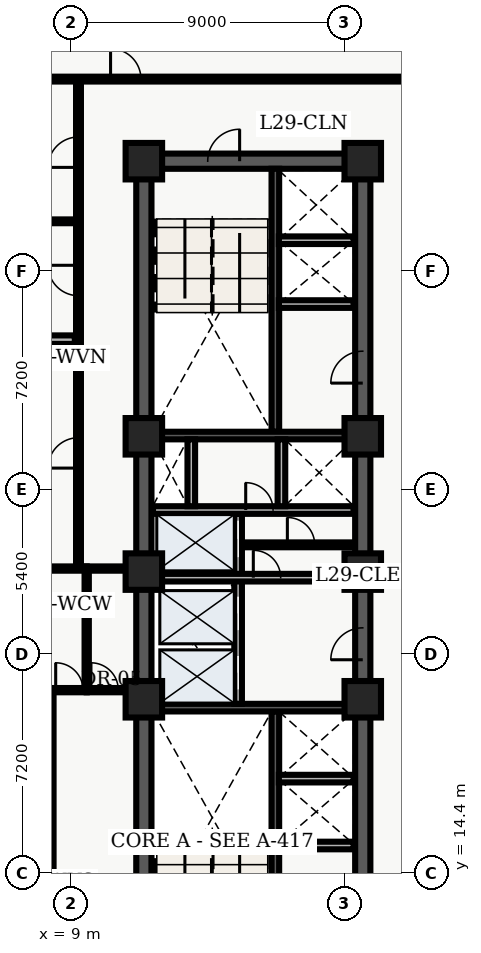
"""IFC4 building model, lengths in metres.
Left out: names, types, materials, properties, quantities, classifications, styles, units other than length and angle.
Written with IfcOpenShell. Run it as: python <this file> out.ifc"""

import sys

from ifc_helpers import new_model, entity, si_unit, converted_unit, direction, frame, origin_with_axes, origin_2d_with_axis, place, context, subcontext, project, spatial, polyline, rectangle, outline, extrude, element, fill, save


model = new_model("IFC4")
c1 = context("Model", 3, precision=1e-05, world=origin_with_axes(), true_north=direction((0.0, 1.0)))
c2 = subcontext(c1, "Body", "Model", "MODEL_VIEW")
j1 = project(units=[si_unit("LENGTHUNIT", "METRE"), converted_unit("PLANEANGLEUNIT", "DEGREE", entity("IfcPlaneAngleMeasure", 0.017), si_unit("PLANEANGLEUNIT", "RADIAN"), dimensions=[0, 0, 0, 0, 0, 0, 0])], contexts=[c1])
p1 = place(None, origin_with_axes())
s1 = spatial("IfcSite", under=j1, at=p1, CompositionType="ELEMENT")
p2 = place(p1, origin_with_axes())
s2 = spatial("IfcBuilding", under=s1, at=p2, CompositionType="ELEMENT")
p3 = place(p2, frame((0.0, 0.0, 120.3), z_axis=(0.0, 0.0, 1.0), x_axis=(1.0, 0.0, 0.0)))
s3 = spatial("IfcBuildingStorey", under=s2, at=p3, CompositionType="ELEMENT", Elevation=120.3)
p4 = place(p3, frame((11.4, 10.8, 0.0), z_axis=(0.0, 0.0, 1.0), x_axis=(0.0, 1.0, 0.0)))
e1 = element("IfcWall", 1, at=p4, inside=s3, PredefinedType="SHEAR", context=c2, shape_type="SweptSolid", body=[
    extrude(outline(polyline([(0.0, -0.25), (27.0, -0.25), (27.0, 0.25), (0.0, 0.25), (0.0, -0.25)])), origin_with_axes(), (0.0, 0.0, 1.0), 3.6),
])
p5 = place(p3, frame((11.4, 37.8, 0.0), z_axis=(0.0, 0.0, 1.0), x_axis=(1.0, 0.0, 0.0)))
e2 = element("IfcWall", 2, at=p5, inside=s3, PredefinedType="SHEAR", context=c2, shape_type="SweptSolid", body=[
    extrude(outline(polyline([(0.0, -0.25), (7.2, -0.25), (7.2, 0.25), (0.0, 0.25), (0.0, -0.25)])), origin_with_axes(), (0.0, 0.0, 1.0), 3.6),
])
p6 = place(p5, frame((2.625, 0.0, 0.0), z_axis=(0.0, 0.0, 1.0), x_axis=(1.0, 0.0, 0.0)))
e3 = element("IfcOpeningElement", 3, at=p6, cuts=e2, PredefinedType="OPENING", context=c2, shape_type="SweptSolid", body=[
    extrude(rectangle(XDim=1.05, YDim=0.52, at=origin_2d_with_axis()), origin_with_axes(), (0.0, 0.0, 1.0), 2.15),
])
p7 = place(p3, frame((18.6, 10.8, 0.0), z_axis=(0.0, 0.0, 1.0), x_axis=(0.0, 1.0, 0.0)))
e4 = element("IfcWall", 4, at=p7, inside=s3, PredefinedType="SHEAR", context=c2, shape_type="SweptSolid", body=[
    extrude(outline(polyline([(0.0, -0.25), (13.5, -0.25), (13.5, 0.25), (0.0, 0.25), (0.0, -0.25)])), origin_with_axes(), (0.0, 0.0, 1.0), 3.6),
])
p8 = place(p7, frame((11.125, 0.0, 0.0), z_axis=(0.0, 0.0, 1.0), x_axis=(1.0, 0.0, 0.0)))
e5 = element("IfcOpeningElement", 5, at=p8, cuts=e4, PredefinedType="OPENING", context=c2, shape_type="SweptSolid", body=[
    extrude(rectangle(XDim=1.05, YDim=0.52, at=origin_2d_with_axis()), origin_with_axes(), (0.0, 0.0, 1.0), 2.15),
])
p9 = place(p7, frame((2.325, 0.0, 0.0), z_axis=(0.0, 0.0, 1.0), x_axis=(1.0, 0.0, 0.0)))
e6 = element("IfcOpeningElement", 6, at=p9, cuts=e4, PredefinedType="OPENING", context=c2, shape_type="SweptSolid", body=[
    extrude(rectangle(XDim=0.95, YDim=0.52, at=origin_2d_with_axis()), origin_with_axes(), (0.0, 0.0, 1.0), 2.15),
])
p10 = place(p3, frame((18.6, 24.3, 0.0), z_axis=(0.0, 0.0, 1.0), x_axis=(0.0, 1.0, 0.0)))
e7 = element("IfcWall", 7, at=p10, inside=s3, PredefinedType="SHEAR", context=c2, shape_type="SweptSolid", body=[
    extrude(outline(polyline([(0.0, -0.25), (13.5, -0.25), (13.5, 0.25), (0.0, 0.25), (0.0, -0.25)])), origin_with_axes(), (0.0, 0.0, 1.0), 3.6),
])
p11 = place(p10, frame((6.725, 0.0, 0.0), z_axis=(0.0, 0.0, 1.0), x_axis=(1.0, 0.0, 0.0)))
e8 = element("IfcOpeningElement", 8, at=p11, cuts=e7, PredefinedType="OPENING", context=c2, shape_type="SweptSolid", body=[
    extrude(rectangle(XDim=1.05, YDim=0.52, at=origin_2d_with_axis()), origin_with_axes(), (0.0, 0.0, 1.0), 2.15),
])
p12 = place(p3, frame((15.725, 11.05, 0.0), z_axis=(0.0, 0.0, 1.0), x_axis=(0.0, 1.0, 0.0)))
e9 = element("IfcWall", 9, at=p12, inside=s3, PredefinedType="SHEAR", context=c2, shape_type="SweptSolid", body=[
    extrude(outline(polyline([(0.0, -0.125), (8.65, -0.125), (8.65, 0.125), (0.0, 0.125), (0.0, -0.125)])), origin_with_axes(), (0.0, 0.0, 1.0), 3.6),
])
p13 = place(p3, frame((11.65, 19.825, 0.0), z_axis=(0.0, 0.0, 1.0), x_axis=(1.0, 0.0, 0.0)))
e10 = element("IfcWall", 10, at=p13, inside=s3, PredefinedType="SHEAR", context=c2, shape_type="SweptSolid", body=[
    extrude(outline(polyline([(0.0, -0.125), (6.7, -0.125), (6.7, 0.125), (0.0, 0.125), (0.0, -0.125)])), origin_with_axes(), (0.0, 0.0, 1.0), 3.6),
])
p14 = place(p3, frame((15.725, 28.9, 0.0), z_axis=(0.0, 0.0, 1.0), x_axis=(0.0, 1.0, 0.0)))
e11 = element("IfcWall", 11, at=p14, inside=s3, PredefinedType="SHEAR", context=c2, shape_type="SweptSolid", body=[
    extrude(outline(polyline([(0.0, -0.125), (8.65, -0.125), (8.65, 0.125), (0.0, 0.125), (0.0, -0.125)])), origin_with_axes(), (0.0, 0.0, 1.0), 3.6),
])
p15 = place(p3, frame((11.65, 28.775, 0.0), z_axis=(0.0, 0.0, 1.0), x_axis=(1.0, 0.0, 0.0)))
e12 = element("IfcWall", 12, at=p15, inside=s3, PredefinedType="SHEAR", context=c2, shape_type="SweptSolid", body=[
    extrude(outline(polyline([(0.0, -0.125), (6.7, -0.125), (6.7, 0.125), (0.0, 0.125), (0.0, -0.125)])), origin_with_axes(), (0.0, 0.0, 1.0), 3.6),
])
p16 = place(p3, frame((14.5, 19.95, 0.0), z_axis=(0.0, 0.0, 1.0), x_axis=(0.0, 1.0, 0.0)))
e13 = element("IfcWall", 13, at=p16, inside=s3, PredefinedType="SOLIDWALL", context=c2, shape_type="SweptSolid", body=[
    extrude(outline(polyline([(0.0, -0.125), (6.25, -0.125), (6.25, 0.125), (0.0, 0.125), (0.0, -0.125)])), origin_with_axes(), (0.0, 0.0, 1.0), 2.64),
])
p17 = place(p16, frame((1.025, 0.0, 0.0), z_axis=(0.0, 0.0, 1.0), x_axis=(1.0, 0.0, 0.0)))
e14 = element("IfcOpeningElement", 14, at=p17, cuts=e13, PredefinedType="OPENING", context=c2, shape_type="SweptSolid", body=[
    extrude(rectangle(XDim=1.1, YDim=0.27, at=origin_2d_with_axis()), origin_with_axes(), (0.0, 0.0, 1.0), 2.15),
])
p18 = place(p16, frame((2.975, 0.0, 0.0), z_axis=(0.0, 0.0, 1.0), x_axis=(1.0, 0.0, 0.0)))
e15 = element("IfcOpeningElement", 15, at=p18, cuts=e13, PredefinedType="OPENING", context=c2, shape_type="SweptSolid", body=[
    extrude(rectangle(XDim=1.1, YDim=0.27, at=origin_2d_with_axis()), origin_with_axes(), (0.0, 0.0, 1.0), 2.15),
])
p19 = place(p16, frame((5.425, 0.0, 0.0), z_axis=(0.0, 0.0, 1.0), x_axis=(1.0, 0.0, 0.0)))
e16 = element("IfcOpeningElement", 16, at=p19, cuts=e13, PredefinedType="OPENING", context=c2, shape_type="SweptSolid", body=[
    extrude(rectangle(XDim=1.2, YDim=0.27, at=origin_2d_with_axis()), origin_with_axes(), (0.0, 0.0, 1.0), 2.15),
])
p20 = place(p3, frame((11.7, 24.1, 0.0), z_axis=(0.0, 0.0, 1.0), x_axis=(1.0, 0.0, 0.0)))
e17 = element("IfcWall", 17, at=p20, inside=s3, PredefinedType="SOLIDWALL", context=c2, shape_type="SweptSolid", body=[
    extrude(outline(polyline([(0.0, -0.125), (6.6, -0.125), (6.6, 0.125), (0.0, 0.125), (0.0, -0.125)])), origin_with_axes(), (0.0, 0.0, 1.0), 2.64),
])
p21 = place(p20, frame((3.75, 0.0, 0.0), z_axis=(0.0, 0.0, 1.0), x_axis=(1.0, 0.0, 0.0)))
e18 = element("IfcOpeningElement", 18, at=p21, cuts=e17, PredefinedType="OPENING", context=c2, shape_type="SweptSolid", body=[
    extrude(rectangle(XDim=0.9, YDim=0.27, at=origin_2d_with_axis()), origin_with_axes(), (0.0, 0.0, 1.0), 2.15),
])
p22 = place(p3, frame((11.7, 26.325, 0.0), z_axis=(0.0, 0.0, 1.0), x_axis=(1.0, 0.0, 0.0)))
e19 = element("IfcWall", 19, at=p22, inside=s3, PredefinedType="SOLIDWALL", context=c2, shape_type="SweptSolid", body=[
    extrude(outline(polyline([(0.0, -0.125), (6.6, -0.125), (6.6, 0.125), (0.0, 0.125), (0.0, -0.125)])), origin_with_axes(), (0.0, 0.0, 1.0), 2.64),
])
p23 = place(p22, frame((3.5, 0.0, 0.0), z_axis=(0.0, 0.0, 1.0), x_axis=(1.0, 0.0, 0.0)))
e20 = element("IfcOpeningElement", 20, at=p23, cuts=e19, PredefinedType="OPENING", context=c2, shape_type="SweptSolid", body=[
    extrude(rectangle(XDim=0.9, YDim=0.27, at=origin_2d_with_axis()), origin_with_axes(), (0.0, 0.0, 1.0), 2.15),
])
for number, where, z_axis, x_axis in (
    (21, (12.96, 26.45, 0.0), (0.0, 0.0, 1.0), (0.0, 1.0, 0.0)),
    (22, (15.925, 26.45, 0.0), (0.0, 0.0, 1.0), (0.0, 1.0, 0.0)),
):
    element("IfcWall", number, at=place(p3, frame(where, z_axis=z_axis, x_axis=x_axis)), inside=s3, PredefinedType="SOLIDWALL", context=c2, shape_type="SweptSolid", body=[
        extrude(outline(polyline([(0.0, -0.125), (2.2, -0.125), (2.2, 0.125), (0.0, 0.125), (0.0, -0.125)])), origin_with_axes(), (0.0, 0.0, 1.0), 2.64),
    ])
for number, where, z_axis, x_axis in (
    (23, (11.4, 20.1, 0.0), (0.0, 0.0, 1.0), (1.0, 0.0, 0.0)),
    (24, (11.4, 24.3, 0.0), (0.0, 0.0, 1.0), (1.0, 0.0, 0.0)),
    (25, (11.4, 28.75, 0.0), (0.0, 0.0, 1.0), (1.0, 0.0, 0.0)),
    (26, (11.4, 37.8, 0.0), (0.0, 0.0, 1.0), (1.0, 0.0, 0.0)),
    (27, (18.6, 20.1, 0.0), (0.0, 0.0, 1.0), (1.0, 0.0, 0.0)),
    (28, (18.6, 24.3, 0.0), (0.0, 0.0, 1.0), (1.0, 0.0, 0.0)),
    (29, (18.6, 28.75, 0.0), (0.0, 0.0, 1.0), (1.0, 0.0, 0.0)),
    (30, (18.6, 37.8, 0.0), (0.0, 0.0, 1.0), (1.0, 0.0, 0.0)),
):
    element("IfcColumn", number, at=place(p3, frame(where, z_axis=z_axis, x_axis=x_axis)), inside=s3, PredefinedType="COLUMN", context=c2, shape_type="SweptSolid", body=[
        extrude(rectangle(XDim=1.2, YDim=1.2, at=origin_2d_with_axis()), origin_with_axes(), (0.0, 0.0, 1.0), 3.9),
    ])
p24 = place(p3, frame((14.62, 25.18, 0.0), z_axis=(0.0, 0.0, 1.0), x_axis=(1.0, 0.0, 0.0)))
e31 = element("IfcWall", 31, at=p24, inside=s3, PredefinedType="PARTITIONING", context=c2, shape_type="SweptSolid", body=[
    extrude(outline(polyline([(0.0, -0.08), (3.68, -0.08), (3.68, 0.08), (0.0, 0.08), (0.0, -0.08)])), origin_with_axes(), (0.0, 0.0, 1.0), 2.64),
])
p25 = place(p24, frame((1.95, 0.0, 0.0), z_axis=(0.0, 0.0, 1.0), x_axis=(1.0, 0.0, 0.0)))
e32 = element("IfcOpeningElement", 32, at=p25, cuts=e31, PredefinedType="OPENING", context=c2, shape_type="SweptSolid", body=[
    extrude(rectangle(XDim=0.9, YDim=0.18, at=origin_2d_with_axis()), origin_with_axes(), (0.0, 0.0, 1.0), 2.15),
])
for number, where, z_axis, x_axis in (
    (33, (15.84, 15.29, 0.0), (0.0, 0.0, 1.0), (1.0, 0.0, 0.0)),
    (34, (15.84, 17.49, 0.0), (0.0, 0.0, 1.0), (1.0, 0.0, 0.0)),
    (35, (15.84, 33.1, 0.0), (0.0, 0.0, 1.0), (1.0, 0.0, 0.0)),
    (36, (15.84, 35.2, 0.0), (0.0, 0.0, 1.0), (1.0, 0.0, 0.0)),
):
    element("IfcWall", number, at=place(p3, frame(where, z_axis=z_axis, x_axis=x_axis)), inside=s3, PredefinedType="SOLIDWALL", context=c2, shape_type="SweptSolid", body=[
        extrude(outline(polyline([(0.0, -0.125), (2.46, -0.125), (2.46, 0.125), (0.0, 0.125), (0.0, -0.125)])), origin_with_axes(), (0.0, 0.0, 1.0), 2.64),
    ])
p26 = place(p3, frame((9.52, 20.4, 0.0), z_axis=(0.0, 0.0, 1.0), x_axis=(0.0, 1.0, 0.0)))
e37 = element("IfcWall", 37, at=p26, inside=s3, PredefinedType="PARTITIONING", context=c2, shape_type="SweptSolid", body=[
    extrude(outline(polyline([(0.0, -0.07), (4.0, -0.07), (4.0, 0.07), (0.0, 0.07), (0.0, -0.07)])), origin_with_axes(), (0.0, 0.0, 1.0), 2.64),
])
p27 = place(p3, frame((9.52, 20.4, 0.0), z_axis=(0.0, 0.0, 1.0), x_axis=(1.0, 0.0, 0.0)))
e38 = element("IfcWall", 38, at=p27, inside=s3, PredefinedType="PARTITIONING", context=c2, shape_type="SweptSolid", body=[
    extrude(outline(polyline([(0.0, -0.07), (1.58, -0.07), (1.58, 0.07), (0.0, 0.07), (0.0, -0.07)])), origin_with_axes(), (0.0, 0.0, 1.0), 2.64),
])
p28 = place(p27, frame((0.59, 0.0, 0.0), z_axis=(0.0, 0.0, 1.0), x_axis=(1.0, 0.0, 0.0)))
e39 = element("IfcOpeningElement", 39, at=p28, cuts=e38, PredefinedType="OPENING", context=c2, shape_type="SweptSolid", body=[
    extrude(rectangle(XDim=0.9, YDim=0.16, at=origin_2d_with_axis()), origin_with_axes(), (0.0, 0.0, 1.0), 2.15),
])
p29 = place(p3, frame((9.52, 24.4, 0.0), z_axis=(0.0, 0.0, 1.0), x_axis=(1.0, 0.0, 0.0)))
e40 = element("IfcWall", 40, at=p29, inside=s3, PredefinedType="PARTITIONING", context=c2, shape_type="SweptSolid", body=[
    extrude(outline(polyline([(0.0, -0.07), (1.58, -0.07), (1.58, 0.07), (0.0, 0.07), (0.0, -0.07)])), origin_with_axes(), (0.0, 0.0, 1.0), 2.64),
])
p30 = place(p3, frame((2.6, 40.5, 0.0), z_axis=(0.0, 0.0, 1.0), x_axis=(1.0, 0.0, 0.0)))
e41 = element("IfcWall", 41, at=p30, inside=s3, PredefinedType="PARTITIONING", context=c2, shape_type="SweptSolid", body=[
    extrude(outline(polyline([(0.0, -0.08), (18.65, -0.08), (18.65, 0.08), (0.0, 0.08), (0.0, -0.08)])), origin_with_axes(), (0.0, 0.0, 1.0), 2.64),
])
p31 = place(p30, frame((8.205, 0.0, 0.0), z_axis=(0.0, 0.0, 1.0), x_axis=(1.0, 0.0, 0.0)))
e42 = element("IfcOpeningElement", 42, at=p31, cuts=e41, PredefinedType="OPENING", context=c2, shape_type="SweptSolid", body=[
    extrude(rectangle(XDim=1.0, YDim=0.18, at=origin_2d_with_axis()), origin_with_axes(), (0.0, 0.0, 1.0), 2.15),
])
p32 = place(p3, frame((8.35, 7.8, 0.0), z_axis=(0.0, 0.0, 1.0), x_axis=(0.0, 1.0, 0.0)))
e43 = element("IfcWall", 43, at=p32, inside=s3, PredefinedType="PARTITIONING", context=c2, shape_type="SweptSolid", body=[
    extrude(outline(polyline([(0.0, -0.08), (12.6, -0.08), (12.6, 0.08), (0.0, 0.08), (0.0, -0.08)])), origin_with_axes(), (0.0, 0.0, 1.0), 2.64),
])
p33 = place(p32, frame((2.914, 0.0, 0.0), z_axis=(0.0, 0.0, 1.0), x_axis=(1.0, 0.0, 0.0)))
e44 = element("IfcOpeningElement", 44, at=p33, cuts=e43, PredefinedType="OPENING", context=c2, shape_type="SweptSolid", body=[
    extrude(rectangle(XDim=1.0, YDim=0.18, at=origin_2d_with_axis()), origin_with_axes(), (0.0, 0.0, 1.0), 2.15),
])
p34 = place(p32, frame((9.11, 0.0, 0.0), z_axis=(0.0, 0.0, 1.0), x_axis=(1.0, 0.0, 0.0)))
e45 = element("IfcOpeningElement", 45, at=p34, cuts=e43, PredefinedType="OPENING", context=c2, shape_type="SweptSolid", body=[
    extrude(rectangle(XDim=1.0, YDim=0.18, at=origin_2d_with_axis()), origin_with_axes(), (0.0, 0.0, 1.0), 2.15),
])
p35 = place(p3, frame((9.25, 24.4, 0.0), z_axis=(0.0, 0.0, 1.0), x_axis=(0.0, 1.0, 0.0)))
e46 = element("IfcWall", 46, at=p35, inside=s3, PredefinedType="PARTITIONING", context=c2, shape_type="SweptSolid", body=[
    extrude(outline(polyline([(0.0, -0.08), (16.1, -0.08), (16.1, 0.08), (0.0, 0.08), (0.0, -0.08)])), origin_with_axes(), (0.0, 0.0, 1.0), 2.64),
])
p36 = place(p35, frame((3.804, 0.0, 0.0), z_axis=(0.0, 0.0, 1.0), x_axis=(1.0, 0.0, 0.0)))
e47 = element("IfcOpeningElement", 47, at=p36, cuts=e46, PredefinedType="OPENING", context=c2, shape_type="SweptSolid", body=[
    extrude(rectangle(XDim=1.0, YDim=0.18, at=origin_2d_with_axis()), origin_with_axes(), (0.0, 0.0, 1.0), 2.15),
])
p37 = place(p35, frame((9.476, 0.0, 0.0), z_axis=(0.0, 0.0, 1.0), x_axis=(1.0, 0.0, 0.0)))
e48 = element("IfcOpeningElement", 48, at=p37, cuts=e46, PredefinedType="OPENING", context=c2, shape_type="SweptSolid", body=[
    extrude(rectangle(XDim=1.0, YDim=0.18, at=origin_2d_with_axis()), origin_with_axes(), (0.0, 0.0, 1.0), 2.15),
])
p38 = place(p35, frame((13.696, 0.0, 0.0), z_axis=(0.0, 0.0, 1.0), x_axis=(1.0, 0.0, 0.0)))
e49 = element("IfcOpeningElement", 49, at=p38, cuts=e46, PredefinedType="OPENING", context=c2, shape_type="SweptSolid", body=[
    extrude(rectangle(XDim=1.0, YDim=0.18, at=origin_2d_with_axis()), origin_with_axes(), (0.0, 0.0, 1.0), 2.15),
])
p39 = place(p3, frame((0.36, 20.4, 0.0), z_axis=(0.0, 0.0, 1.0), x_axis=(1.0, 0.0, 0.0)))
e50 = element("IfcWall", 50, at=p39, inside=s3, PredefinedType="PARTITIONING", context=c2, shape_type="SweptSolid", body=[
    extrude(outline(polyline([(0.0, -0.07), (9.16, -0.07), (9.16, 0.07), (0.0, 0.07), (0.0, -0.07)])), origin_with_axes(), (0.0, 0.0, 1.0), 2.64),
])
p40 = place(p39, frame((8.59, 0.0, 0.0), z_axis=(0.0, 0.0, 1.0), x_axis=(1.0, 0.0, 0.0)))
e51 = element("IfcOpeningElement", 51, at=p40, cuts=e50, PredefinedType="OPENING", context=c2, shape_type="SweptSolid", body=[
    extrude(rectangle(XDim=0.9, YDim=0.16, at=origin_2d_with_axis()), origin_with_axes(), (0.0, 0.0, 1.0), 2.15),
])
p41 = place(p3, frame((0.36, 24.4, 0.0), z_axis=(0.0, 0.0, 1.0), x_axis=(1.0, 0.0, 0.0)))
e52 = element("IfcWall", 52, at=p41, inside=s3, PredefinedType="PARTITIONING", context=c2, shape_type="SweptSolid", body=[
    extrude(outline(polyline([(0.0, -0.07), (9.16, -0.07), (9.16, 0.07), (0.0, 0.07), (0.0, -0.07)])), origin_with_axes(), (0.0, 0.0, 1.0), 2.64),
])
p42 = place(p3, frame((0.375, 31.929, 0.0), z_axis=(0.0, 0.0, 1.0), x_axis=(1.0, 0.0, 0.0)))
e53 = element("IfcWall", 53, at=p42, inside=s3, PredefinedType="PARTITIONING", context=c2, shape_type="SweptSolid", body=[
    extrude(outline(polyline([(0.0, -0.14), (8.755, -0.14), (8.755, 0.14), (0.0, 0.14), (0.0, -0.14)])), origin_with_axes(), (0.0, 0.0, 1.0), 2.64),
])
p43 = place(p3, frame((0.375, 35.822, 0.0), z_axis=(0.0, 0.0, 1.0), x_axis=(1.0, 0.0, 0.0)))
e54 = element("IfcWall", 54, at=p43, inside=s3, PredefinedType="PARTITIONING", context=c2, shape_type="SweptSolid", body=[
    extrude(outline(polyline([(0.0, -0.062), (8.755, -0.062), (8.755, 0.062), (0.0, 0.062), (0.0, -0.062)])), origin_with_axes(), (0.0, 0.0, 1.0), 2.64),
])
p44 = place(p16, frame((1.025, 0.0, 0.0), z_axis=(0.0, 0.0, 1.0), x_axis=(1.0, 0.0, 0.0)))
e55 = element("IfcDoor", 55, at=p44, inside=s3, OperationType="SLIDING_TO_LEFT", PredefinedType="DOOR", context=c2, shape_type="SweptSolid", body=[
    extrude(rectangle(XDim=1.1, YDim=0.09, at=origin_2d_with_axis()), origin_with_axes(), (0.0, 0.0, 1.0), 2.15),
])
fill(e14, e55)
p45 = place(p16, frame((2.975, 0.0, 0.0), z_axis=(0.0, 0.0, 1.0), x_axis=(1.0, 0.0, 0.0)))
e56 = element("IfcDoor", 56, at=p45, inside=s3, OperationType="SLIDING_TO_RIGHT", PredefinedType="DOOR", context=c2, shape_type="SweptSolid", body=[
    extrude(rectangle(XDim=1.1, YDim=0.09, at=origin_2d_with_axis()), origin_with_axes(), (0.0, 0.0, 1.0), 2.15),
])
fill(e15, e56)
p46 = place(p16, frame((5.425, 0.0, 0.0), z_axis=(0.0, 0.0, 1.0), x_axis=(1.0, 0.0, 0.0)))
e57 = element("IfcDoor", 57, at=p46, inside=s3, OperationType="DOUBLE_DOOR_SLIDING", PredefinedType="DOOR", context=c2, shape_type="SweptSolid", body=[
    extrude(rectangle(XDim=1.2, YDim=0.09, at=origin_2d_with_axis()), origin_with_axes(), (0.0, 0.0, 1.0), 2.15),
])
fill(e16, e57)
p47 = place(p5, frame((2.625, 0.0, 0.0), z_axis=(0.0, 0.0, 1.0), x_axis=(1.0, 0.0, 0.0)))
e58 = element("IfcDoor", 58, at=p47, inside=s3, OperationType="SINGLE_SWING_RIGHT", PredefinedType="DOOR", context=c2, shape_type="SweptSolid", body=[
    extrude(rectangle(XDim=1.05, YDim=0.09, at=origin_2d_with_axis()), origin_with_axes(), (0.0, 0.0, 1.0), 2.15),
])
fill(e3, e58)
p48 = place(p7, frame((11.125, 0.0, 0.0), z_axis=(0.0, 0.0, 1.0), x_axis=(1.0, 0.0, 0.0)))
e59 = element("IfcDoor", 59, at=p48, inside=s3, OperationType="SINGLE_SWING_LEFT", PredefinedType="DOOR", context=c2, shape_type="SweptSolid", body=[
    extrude(rectangle(XDim=1.05, YDim=0.09, at=origin_2d_with_axis()), origin_with_axes(), (0.0, 0.0, 1.0), 2.15),
])
fill(e5, e59)
p49 = place(p22, frame((3.5, 0.0, 0.0), z_axis=(0.0, 0.0, 1.0), x_axis=(1.0, 0.0, 0.0)))
e60 = element("IfcDoor", 60, at=p49, inside=s3, OperationType="SINGLE_SWING_LEFT", PredefinedType="DOOR", context=c2, shape_type="SweptSolid", body=[
    extrude(rectangle(XDim=0.9, YDim=0.09, at=origin_2d_with_axis()), origin_with_axes(), (0.0, 0.0, 1.0), 2.15),
])
fill(e20, e60)
p50 = place(p20, frame((3.75, 0.0, 0.0), z_axis=(0.0, 0.0, 1.0), x_axis=(1.0, 0.0, 0.0)))
e61 = element("IfcDoor", 61, at=p50, inside=s3, OperationType="SINGLE_SWING_LEFT", PredefinedType="DOOR", context=c2, shape_type="SweptSolid", body=[
    extrude(rectangle(XDim=0.9, YDim=0.09, at=origin_2d_with_axis()), origin_with_axes(), (0.0, 0.0, 1.0), 2.15),
])
fill(e18, e61)
p51 = place(p24, frame((1.95, 0.0, 0.0), z_axis=(0.0, 0.0, 1.0), x_axis=(1.0, 0.0, 0.0)))
e62 = element("IfcDoor", 62, at=p51, inside=s3, OperationType="SINGLE_SWING_LEFT", PredefinedType="DOOR", context=c2, shape_type="SweptSolid", body=[
    extrude(rectangle(XDim=0.9, YDim=0.09, at=origin_2d_with_axis()), origin_with_axes(), (0.0, 0.0, 1.0), 2.15),
])
fill(e32, e62)
p52 = place(p10, frame((6.725, 0.0, 0.0), z_axis=(0.0, 0.0, 1.0), x_axis=(1.0, 0.0, 0.0)))
e63 = element("IfcDoor", 63, at=p52, inside=s3, OperationType="SINGLE_SWING_LEFT", PredefinedType="DOOR", context=c2, shape_type="SweptSolid", body=[
    extrude(rectangle(XDim=1.05, YDim=0.09, at=origin_2d_with_axis()), origin_with_axes(), (0.0, 0.0, 1.0), 2.15),
])
fill(e8, e63)
p53 = place(p27, frame((0.59, 0.0, 0.0), z_axis=(0.0, 0.0, 1.0), x_axis=(1.0, 0.0, 0.0)))
e64 = element("IfcDoor", 64, at=p53, inside=s3, OperationType="SINGLE_SWING_LEFT", PredefinedType="DOOR", context=c2, shape_type="SweptSolid", body=[
    extrude(rectangle(XDim=0.9, YDim=0.084, at=origin_2d_with_axis()), origin_with_axes(), (0.0, 0.0, 1.0), 2.15),
])
fill(e39, e64)
p54 = place(p39, frame((8.59, 0.0, 0.0), z_axis=(0.0, 0.0, 1.0), x_axis=(1.0, 0.0, 0.0)))
e65 = element("IfcDoor", 65, at=p54, inside=s3, OperationType="SINGLE_SWING_LEFT", PredefinedType="DOOR", context=c2, shape_type="SweptSolid", body=[
    extrude(rectangle(XDim=0.9, YDim=0.084, at=origin_2d_with_axis()), origin_with_axes(), (0.0, 0.0, 1.0), 2.15),
])
fill(e51, e65)
p55 = place(p32, frame((9.11, 0.0, 0.0), z_axis=(0.0, 0.0, 1.0), x_axis=(1.0, 0.0, 0.0)))
e66 = element("IfcDoor", 66, at=p55, inside=s3, OperationType="SINGLE_SWING_RIGHT", PredefinedType="DOOR", context=c2, shape_type="SweptSolid", body=[
    extrude(rectangle(XDim=1.0, YDim=0.09, at=origin_2d_with_axis()), origin_with_axes(), (0.0, 0.0, 1.0), 2.15),
])
fill(e45, e66)
p56 = place(p35, frame((3.804, 0.0, 0.0), z_axis=(0.0, 0.0, 1.0), x_axis=(1.0, 0.0, 0.0)))
e67 = element("IfcDoor", 67, at=p56, inside=s3, OperationType="SINGLE_SWING_LEFT", PredefinedType="DOOR", context=c2, shape_type="SweptSolid", body=[
    extrude(rectangle(XDim=1.0, YDim=0.09, at=origin_2d_with_axis()), origin_with_axes(), (0.0, 0.0, 1.0), 2.15),
])
fill(e47, e67)
p57 = place(p35, frame((9.476, 0.0, 0.0), z_axis=(0.0, 0.0, 1.0), x_axis=(1.0, 0.0, 0.0)))
e68 = element("IfcDoor", 68, at=p57, inside=s3, OperationType="SINGLE_SWING_RIGHT", PredefinedType="DOOR", context=c2, shape_type="SweptSolid", body=[
    extrude(rectangle(XDim=1.0, YDim=0.09, at=origin_2d_with_axis()), origin_with_axes(), (0.0, 0.0, 1.0), 2.15),
])
fill(e48, e68)
p58 = place(p35, frame((13.696, 0.0, 0.0), z_axis=(0.0, 0.0, 1.0), x_axis=(1.0, 0.0, 0.0)))
e69 = element("IfcDoor", 69, at=p58, inside=s3, OperationType="SINGLE_SWING_LEFT", PredefinedType="DOOR", context=c2, shape_type="SweptSolid", body=[
    extrude(rectangle(XDim=1.0, YDim=0.09, at=origin_2d_with_axis()), origin_with_axes(), (0.0, 0.0, 1.0), 2.15),
])
fill(e49, e69)
p59 = place(p30, frame((8.205, 0.0, 0.0), z_axis=(0.0, 0.0, 1.0), x_axis=(1.0, 0.0, 0.0)))
e70 = element("IfcDoor", 70, at=p59, inside=s3, OperationType="SINGLE_SWING_LEFT", PredefinedType="DOOR", context=c2, shape_type="SweptSolid", body=[
    extrude(rectangle(XDim=1.0, YDim=0.09, at=origin_2d_with_axis()), origin_with_axes(), (0.0, 0.0, 1.0), 2.15),
])
fill(e42, e70)
save(model, sys.argv[1])
